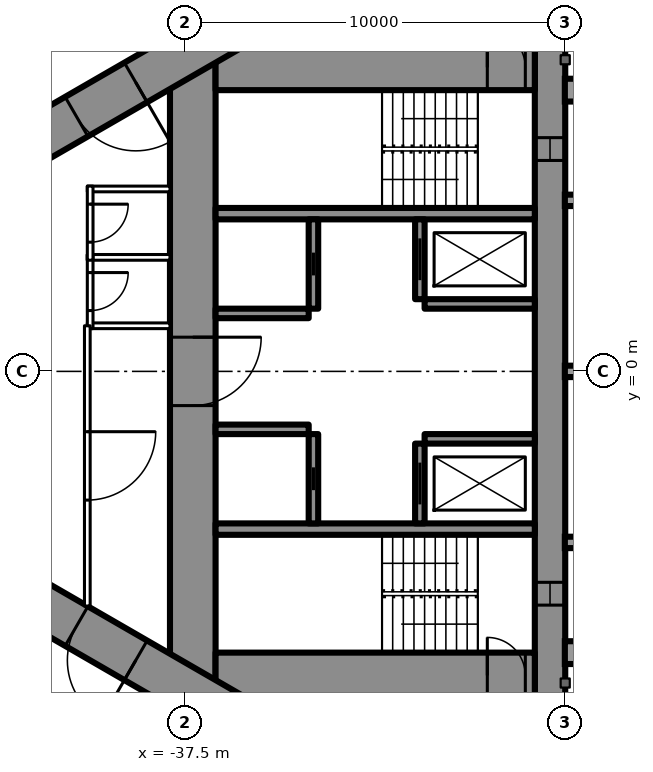
"""IFC4 building model, lengths in metres.
Left out: names, types, materials, properties, quantities, classifications, styles, units other than length and angle.
Written with IfcOpenShell. Run it as: python <this file> out.ifc"""

import sys

from ifc_helpers import new_model, si_unit, direction, frame, frame_2d, origin, place, context, subcontext, project, spatial, rectangle, extrude, element, fill, save


model = new_model("IFC4")
c1 = context("Model", 3, precision=1e-05, world=origin(), true_north=direction((0.0, 1.0)))
c2 = subcontext(c1, "Body", "Model", "MODEL_VIEW")
j1 = project(units=[si_unit("LENGTHUNIT", "METRE"), si_unit("PLANEANGLEUNIT", "RADIAN")], contexts=[c1])
p1 = place(None, origin())
s1 = spatial("IfcSite", under=j1, at=p1, CompositionType="ELEMENT")
p2 = place(p1, origin())
s2 = spatial("IfcBuilding", under=s1, at=p2, CompositionType="ELEMENT")
p3 = place(p2, frame((0.0, 0.0, 18.0)))
s3 = spatial("IfcBuildingStorey", under=s2, at=p3, CompositionType="ELEMENT", Elevation=18.0)
p4 = place(p3, frame((-27.9, 8.6, 0.0), z_axis=(0.0, 0.0, 1.0), x_axis=(0.0, -1.0, 0.0)))
e1 = element("IfcWall", 1, at=p4, inside=s3, PredefinedType="SHEAR", context=c2, shape_type="SweptSolid", body=[
    extrude(rectangle(XDim=17.2, YDim=0.8, at=frame_2d((8.6, 0.0))), origin(), (0.0, 0.0, 1.0), 3.5),
])
p5 = place(p4, frame((2.45, 0.0, 0.6)))
e2 = element("IfcOpeningElement", 2, at=p5, cuts=e1, PredefinedType="OPENING", context=c2, shape_type="SweptSolid", body=[
    extrude(rectangle(XDim=0.6, YDim=2.1, at=frame_2d((0.3, 1.05))), frame((0.0, 0.41, 0.0), z_axis=(0.0, -1.0, 0.0), x_axis=(1.0, 0.0, 0.0)), (0.0, 0.0, 1.0), 0.82),
])
p6 = place(p4, frame((14.15, 0.0, 0.6)))
e3 = element("IfcOpeningElement", 3, at=p6, cuts=e1, PredefinedType="OPENING", context=c2, shape_type="SweptSolid", body=[
    extrude(rectangle(XDim=0.6, YDim=2.1, at=frame_2d((0.3, 1.05))), frame((0.0, 0.41, 0.0), z_axis=(0.0, -1.0, 0.0), x_axis=(1.0, 0.0, 0.0)), (0.0, 0.0, 1.0), 0.82),
])
p7 = place(p3, frame((-37.3, 8.6, 0.0), z_axis=(0.0, 0.0, 1.0), x_axis=(0.0, -1.0, 0.0)))
e4 = element("IfcWall", 4, at=p7, inside=s3, PredefinedType="SHEAR", context=c2, shape_type="SweptSolid", body=[
    extrude(rectangle(XDim=17.2, YDim=1.2, at=frame_2d((8.6, 0.0))), origin(), (0.0, 0.0, 1.0), 3.5),
])
p8 = place(p7, frame((7.7, 0.0, 0.0)))
e5 = element("IfcOpeningElement", 5, at=p8, cuts=e4, PredefinedType="OPENING", context=c2, shape_type="SweptSolid", body=[
    extrude(rectangle(XDim=1.8, YDim=2.2, at=frame_2d((0.9, 1.1))), frame((0.0, 0.61, 0.0), z_axis=(0.0, -1.0, 0.0), x_axis=(1.0, 0.0, 0.0)), (0.0, 0.0, 1.0), 1.22),
])
p9 = place(p3, frame((-28.3, 8.0, 0.0), z_axis=(0.0, 0.0, 1.0), x_axis=(-1.0, 0.0, 0.0)))
e6 = element("IfcWall", 6, at=p9, inside=s3, PredefinedType="SHEAR", context=c2, shape_type="SweptSolid", body=[
    extrude(rectangle(XDim=8.4, YDim=1.2, at=frame_2d((4.2, 0.0))), origin(), (0.0, 0.0, 1.0), 3.5),
])
p10 = place(p9, frame((0.25, 0.0, 0.0)))
e7 = element("IfcOpeningElement", 7, at=p10, cuts=e6, PredefinedType="OPENING", context=c2, shape_type="SweptSolid", body=[
    extrude(rectangle(XDim=1.0, YDim=2.2, at=frame_2d((0.5, 1.1))), frame((0.0, 0.61, 0.0), z_axis=(0.0, -1.0, 0.0), x_axis=(1.0, 0.0, 0.0)), (0.0, 0.0, 1.0), 1.22),
])
p11 = place(p3, frame((-28.3, -8.0, 0.0), z_axis=(0.0, 0.0, 1.0), x_axis=(-1.0, 0.0, 0.0)))
e8 = element("IfcWall", 8, at=p11, inside=s3, PredefinedType="SHEAR", context=c2, shape_type="SweptSolid", body=[
    extrude(rectangle(XDim=8.4, YDim=1.2, at=frame_2d((4.2, 0.0))), origin(), (0.0, 0.0, 1.0), 3.5),
])
p12 = place(p11, frame((0.25, 0.0, 0.0)))
e9 = element("IfcOpeningElement", 9, at=p12, cuts=e8, PredefinedType="OPENING", context=c2, shape_type="SweptSolid", body=[
    extrude(rectangle(XDim=1.0, YDim=2.2, at=frame_2d((0.5, 1.1))), frame((0.0, 0.61, 0.0), z_axis=(0.0, -1.0, 0.0), x_axis=(1.0, 0.0, 0.0)), (0.0, 0.0, 1.0), 1.22),
])
for number, where, z_axis, x_axis in (
    (10, (-28.3, 4.15, 0.0), (0.0, 0.0, 1.0), (-1.0, 0.0, 0.0)),
    (11, (-28.3, -4.15, 0.0), (0.0, 0.0, 1.0), (-1.0, 0.0, 0.0)),
):
    element("IfcWall", number, at=place(p3, frame(where, z_axis=z_axis, x_axis=x_axis)), inside=s3, PredefinedType="SHEAR", context=c2, shape_type="SweptSolid", body=[
        extrude(rectangle(XDim=8.4, YDim=0.3, at=frame_2d((4.2, 0.0))), origin(), (0.0, 0.0, 1.0), 3.5),
    ])
p13 = place(p3, frame((-31.325, 4.0, 0.0), z_axis=(0.0, 0.0, 1.0), x_axis=(0.0, -1.0, 0.0)))
e12 = element("IfcWall", 12, at=p13, inside=s3, PredefinedType="SHEAR", context=c2, shape_type="SweptSolid", body=[
    extrude(rectangle(XDim=2.1, YDim=0.25, at=frame_2d((1.05, 0.0))), origin(), (0.0, 0.0, 1.0), 3.5),
])
p14 = place(p13, frame((0.5, 0.0, 0.0)))
e13 = element("IfcOpeningElement", 13, at=p14, cuts=e12, PredefinedType="OPENING", context=c2, shape_type="SweptSolid", body=[
    extrude(rectangle(XDim=1.1, YDim=2.2, at=frame_2d((0.55, 1.1))), frame((0.0, 0.135, 0.0), z_axis=(0.0, -1.0, 0.0), x_axis=(1.0, 0.0, 0.0)), (0.0, 0.0, 1.0), 0.27),
])
p15 = place(p3, frame((-34.125, 4.0, 0.0), z_axis=(0.0, 0.0, 1.0), x_axis=(0.0, -1.0, 0.0)))
e14 = element("IfcWall", 14, at=p15, inside=s3, PredefinedType="SHEAR", context=c2, shape_type="SweptSolid", body=[
    extrude(rectangle(XDim=2.35, YDim=0.25, at=frame_2d((1.175, 0.0))), origin(), (0.0, 0.0, 1.0), 3.5),
])
p16 = place(p15, frame((0.875, 0.0, 0.0)))
e15 = element("IfcOpeningElement", 15, at=p16, cuts=e14, PredefinedType="OPENING", context=c2, shape_type="SweptSolid", body=[
    extrude(rectangle(XDim=0.6, YDim=2.0, at=frame_2d((0.3, 1.0))), frame((0.0, 0.135, 0.0), z_axis=(0.0, -1.0, 0.0), x_axis=(1.0, 0.0, 0.0)), (0.0, 0.0, 1.0), 0.27),
])
p17 = place(p3, frame((-28.3, 1.775, 0.0), z_axis=(0.0, 0.0, 1.0), x_axis=(-1.0, 0.0, 0.0)))
e16 = element("IfcWall", 16, at=p17, inside=s3, PredefinedType="SHEAR", context=c2, shape_type="SweptSolid", body=[
    extrude(rectangle(XDim=2.9, YDim=0.25, at=frame_2d((1.45, 0.0))), origin(), (0.0, 0.0, 1.0), 3.5),
])
p18 = place(p3, frame((-34.25, 1.525, 0.0), z_axis=(0.0, 0.0, 1.0), x_axis=(-1.0, 0.0, 0.0)))
e17 = element("IfcWall", 17, at=p18, inside=s3, PredefinedType="SHEAR", context=c2, shape_type="SweptSolid", body=[
    extrude(rectangle(XDim=2.45, YDim=0.25, at=frame_2d((1.225, 0.0))), origin(), (0.0, 0.0, 1.0), 3.5),
])
p19 = place(p3, frame((-31.325, -1.9, 0.0), z_axis=(0.0, 0.0, 1.0), x_axis=(0.0, -1.0, 0.0)))
e18 = element("IfcWall", 18, at=p19, inside=s3, PredefinedType="SHEAR", context=c2, shape_type="SweptSolid", body=[
    extrude(rectangle(XDim=2.1, YDim=0.25, at=frame_2d((1.05, 0.0))), origin(), (0.0, 0.0, 1.0), 3.5),
])
p20 = place(p19, frame((0.5, 0.0, 0.0)))
e19 = element("IfcOpeningElement", 19, at=p20, cuts=e18, PredefinedType="OPENING", context=c2, shape_type="SweptSolid", body=[
    extrude(rectangle(XDim=1.1, YDim=2.2, at=frame_2d((0.55, 1.1))), frame((0.0, 0.135, 0.0), z_axis=(0.0, -1.0, 0.0), x_axis=(1.0, 0.0, 0.0)), (0.0, 0.0, 1.0), 0.27),
])
p21 = place(p3, frame((-34.125, -1.65, 0.0), z_axis=(0.0, 0.0, 1.0), x_axis=(0.0, -1.0, 0.0)))
e20 = element("IfcWall", 20, at=p21, inside=s3, PredefinedType="SHEAR", context=c2, shape_type="SweptSolid", body=[
    extrude(rectangle(XDim=2.35, YDim=0.25, at=frame_2d((1.175, 0.0))), origin(), (0.0, 0.0, 1.0), 3.5),
])
p22 = place(p21, frame((0.875, 0.0, 0.0)))
e21 = element("IfcOpeningElement", 21, at=p22, cuts=e20, PredefinedType="OPENING", context=c2, shape_type="SweptSolid", body=[
    extrude(rectangle(XDim=0.6, YDim=2.0, at=frame_2d((0.3, 1.0))), frame((0.0, 0.135, 0.0), z_axis=(0.0, -1.0, 0.0), x_axis=(1.0, 0.0, 0.0)), (0.0, 0.0, 1.0), 0.27),
])
p23 = place(p3, frame((-28.3, -1.775, 0.0), z_axis=(0.0, 0.0, 1.0), x_axis=(-1.0, 0.0, 0.0)))
e22 = element("IfcWall", 22, at=p23, inside=s3, PredefinedType="SHEAR", context=c2, shape_type="SweptSolid", body=[
    extrude(rectangle(XDim=2.9, YDim=0.25, at=frame_2d((1.45, 0.0))), origin(), (0.0, 0.0, 1.0), 3.5),
])
p24 = place(p3, frame((-34.25, -1.525, 0.0), z_axis=(0.0, 0.0, 1.0), x_axis=(-1.0, 0.0, 0.0)))
e23 = element("IfcWall", 23, at=p24, inside=s3, PredefinedType="SHEAR", context=c2, shape_type="SweptSolid", body=[
    extrude(rectangle(XDim=2.45, YDim=0.25, at=frame_2d((1.225, 0.0))), origin(), (0.0, 0.0, 1.0), 3.5),
])
p25 = place(p3, frame((-27.2, 14.3, 0.0), z_axis=(0.0, 0.0, 1.0), x_axis=(-0.866026593062, -0.499997940104, 0.0)))
e24 = element("IfcWall", 24, at=p25, inside=s3, PredefinedType="SHEAR", context=c2, shape_type="SweptSolid", body=[
    extrude(rectangle(XDim=28.946, YDim=1.2, at=frame_2d((14.473, 0.0))), origin(), (0.0, 0.0, 1.0), 3.5),
])
p26 = place(p25, frame((4.6, 0.0, 0.0)))
e25 = element("IfcOpeningElement", 25, at=p26, cuts=e24, PredefinedType="OPENING", context=c2, shape_type="SweptSolid", body=[
    extrude(rectangle(XDim=1.0, YDim=2.2, at=frame_2d((0.5, 1.1))), frame((0.0, 0.61, 0.0), z_axis=(0.0, -1.0, 0.0), x_axis=(1.0, 0.0, 0.0)), (0.0, 0.0, 1.0), 1.22),
])
p27 = place(p25, frame((13.395, 0.0, 0.0)))
e26 = element("IfcOpeningElement", 26, at=p27, cuts=e24, PredefinedType="OPENING", context=c2, shape_type="SweptSolid", body=[
    extrude(rectangle(XDim=1.8, YDim=2.2, at=frame_2d((0.9, 1.1))), frame((0.0, 0.61, 0.0), z_axis=(0.0, -1.0, 0.0), x_axis=(1.0, 0.0, 0.0)), (0.0, 0.0, 1.0), 1.22),
])
p28 = place(p3, frame((-27.2, -14.3, 0.0), z_axis=(0.0, 0.0, 1.0), x_axis=(-0.866024021859, 0.500002393557, 0.0)))
e27 = element("IfcWall", 27, at=p28, inside=s3, PredefinedType="SHEAR", context=c2, shape_type="SweptSolid", body=[
    extrude(rectangle(XDim=27.907, YDim=1.2, at=frame_2d((13.954, 0.0))), origin(), (0.0, 0.0, 1.0), 3.5),
])
p29 = place(p28, frame((4.6, 0.0, 0.0)))
e28 = element("IfcOpeningElement", 28, at=p29, cuts=e27, PredefinedType="OPENING", context=c2, shape_type="SweptSolid", body=[
    extrude(rectangle(XDim=1.0, YDim=2.2, at=frame_2d((0.5, 1.1))), frame((0.0, 0.61, 0.0), z_axis=(0.0, -1.0, 0.0), x_axis=(1.0, 0.0, 0.0)), (0.0, 0.0, 1.0), 1.22),
])
p30 = place(p28, frame((13.395, 0.0, 0.0)))
e29 = element("IfcOpeningElement", 29, at=p30, cuts=e27, PredefinedType="OPENING", context=c2, shape_type="SweptSolid", body=[
    extrude(rectangle(XDim=1.8, YDim=2.2, at=frame_2d((0.9, 1.1))), frame((0.0, 0.61, 0.0), z_axis=(0.0, -1.0, 0.0), x_axis=(1.0, 0.0, 0.0)), (0.0, 0.0, 1.0), 1.22),
])
p31 = place(p3, frame((-37.7, 10.894, 0.0), z_axis=(0.0, 0.0, 1.0), x_axis=(-0.866027905338, -0.499995667157, 0.0)))
e30 = element("IfcWall", 30, at=p31, inside=s3, PredefinedType="PARTITIONING", context=c2, shape_type="SweptSolid", body=[
    extrude(rectangle(XDim=21.787, YDim=0.2, at=frame_2d((10.894, 0.0))), origin(), (0.0, 0.0, 1.0), 3.25),
])
p32 = place(p31, frame((11.78, 0.0, 0.0)))
e31 = element("IfcOpeningElement", 31, at=p32, cuts=e30, PredefinedType="OPENING", context=c2, shape_type="SweptSolid", body=[
    extrude(rectangle(XDim=0.95, YDim=2.2, at=frame_2d((0.475, 1.1))), frame((0.0, 0.11, 0.0), z_axis=(0.0, -1.0, 0.0), x_axis=(1.0, 0.0, 0.0)), (0.0, 0.0, 1.0), 0.22),
])
p33 = place(p31, frame((7.73, 0.0, 0.0)))
e32 = element("IfcOpeningElement", 32, at=p33, cuts=e30, PredefinedType="OPENING", context=c2, shape_type="SweptSolid", body=[
    extrude(rectangle(XDim=0.95, YDim=2.2, at=frame_2d((0.475, 1.1))), frame((0.0, 0.11, 0.0), z_axis=(0.0, -1.0, 0.0), x_axis=(1.0, 0.0, 0.0)), (0.0, 0.0, 1.0), 0.22),
])
p34 = place(p3, frame((-36.92, -11.344, 0.0), z_axis=(0.0, 0.0, 1.0), x_axis=(-0.866028313256, 0.499994960614, 0.0)))
e33 = element("IfcWall", 33, at=p34, inside=s3, PredefinedType="PARTITIONING", context=c2, shape_type="SweptSolid", body=[
    extrude(rectangle(XDim=22.568, YDim=0.2, at=frame_2d((11.284, 0.0))), origin(), (0.0, 0.0, 1.0), 3.25),
])
p35 = place(p34, frame((15.03, 0.0, 0.0)))
e34 = element("IfcOpeningElement", 34, at=p35, cuts=e33, PredefinedType="OPENING", context=c2, shape_type="SweptSolid", body=[
    extrude(rectangle(XDim=0.95, YDim=2.2, at=frame_2d((0.475, 1.1))), frame((0.0, 0.11, 0.0), z_axis=(0.0, -1.0, 0.0), x_axis=(1.0, 0.0, 0.0)), (0.0, 0.0, 1.0), 0.22),
])
p36 = place(p34, frame((3.35, 0.0, 0.0)))
e35 = element("IfcOpeningElement", 35, at=p36, cuts=e33, PredefinedType="OPENING", context=c2, shape_type="SweptSolid", body=[
    extrude(rectangle(XDim=1.0, YDim=2.2, at=frame_2d((0.5, 1.1))), frame((0.0, 0.11, 0.0), z_axis=(0.0, -1.0, 0.0), x_axis=(1.0, 0.0, 0.0)), (0.0, 0.0, 1.0), 0.22),
])
for number, where, z_axis, x_axis in (
    (36, (-37.9, 1.2, 0.0), (0.0, 0.0, 1.0), (-1.0, 0.0, 0.0)),
    (37, (-37.9, 3.0, 0.0), (0.0, 0.0, 1.0), (-1.0, 0.0, 0.0)),
    (38, (-37.9, 4.8, 0.0), (0.0, 0.0, 1.0), (-1.0, 0.0, 0.0)),
):
    element("IfcWall", number, at=place(p3, frame(where, z_axis=z_axis, x_axis=x_axis)), inside=s3, PredefinedType="PARTITIONING", context=c2, shape_type="SweptSolid", body=[
        extrude(rectangle(XDim=2.175, YDim=0.15, at=frame_2d((1.087, 0.0))), origin(), (0.0, 0.0, 1.0), 3.25),
    ])
p37 = place(p3, frame((-40.0, 3.075, 0.0), z_axis=(0.0, 0.0, 1.0), x_axis=(0.0, -1.0, 0.0)))
e39 = element("IfcWall", 39, at=p37, inside=s3, PredefinedType="PARTITIONING", context=c2, shape_type="SweptSolid", body=[
    extrude(rectangle(XDim=1.95, YDim=0.15, at=frame_2d((0.975, 0.0))), origin(), (0.0, 0.0, 1.0), 3.25),
])
p38 = place(p37, frame((0.475, 0.0, 0.0)))
e40 = element("IfcOpeningElement", 40, at=p38, cuts=e39, PredefinedType="OPENING", context=c2, shape_type="SweptSolid", body=[
    extrude(rectangle(XDim=1.0, YDim=2.2, at=frame_2d((0.5, 1.1))), frame((0.0, 0.085, 0.0), z_axis=(0.0, -1.0, 0.0), x_axis=(1.0, 0.0, 0.0)), (0.0, 0.0, 1.0), 0.17),
])
p39 = place(p3, frame((-40.0, 4.875, 0.0), z_axis=(0.0, 0.0, 1.0), x_axis=(0.0, -1.0, 0.0)))
e41 = element("IfcWall", 41, at=p39, inside=s3, PredefinedType="PARTITIONING", context=c2, shape_type="SweptSolid", body=[
    extrude(rectangle(XDim=1.95, YDim=0.15, at=frame_2d((0.975, 0.0))), origin(), (0.0, 0.0, 1.0), 3.25),
])
p40 = place(p39, frame((0.475, 0.0, 0.0)))
e42 = element("IfcOpeningElement", 42, at=p40, cuts=e41, PredefinedType="OPENING", context=c2, shape_type="SweptSolid", body=[
    extrude(rectangle(XDim=1.0, YDim=2.2, at=frame_2d((0.5, 1.1))), frame((0.0, 0.085, 0.0), z_axis=(0.0, -1.0, 0.0), x_axis=(1.0, 0.0, 0.0)), (0.0, 0.0, 1.0), 0.17),
])
p41 = place(p3, frame((-40.075, 1.2, 0.0), z_axis=(0.0, 0.0, 1.0), x_axis=(0.0, -1.0, 0.0)))
e43 = element("IfcWall", 43, at=p41, inside=s3, PredefinedType="PARTITIONING", context=c2, shape_type="SweptSolid", body=[
    extrude(rectangle(XDim=7.374, YDim=0.15, at=frame_2d((3.687, 0.0))), origin(), (0.0, 0.0, 1.0), 3.25),
])
p42 = place(p41, frame((2.787, 0.0, 0.0)))
e44 = element("IfcOpeningElement", 44, at=p42, cuts=e43, PredefinedType="OPENING", context=c2, shape_type="SweptSolid", body=[
    extrude(rectangle(XDim=1.8, YDim=2.2, at=frame_2d((0.9, 1.1))), frame((0.0, 0.085, 0.0), z_axis=(0.0, -1.0, 0.0), x_axis=(1.0, 0.0, 0.0)), (0.0, 0.0, 1.0), 0.17),
])
p43 = place(p38, origin())
e45 = element("IfcDoor", 45, at=p43, inside=s3, OperationType="SINGLE_SWING_LEFT", PredefinedType="DOOR", context=c2, shape_type="SweptSolid", body=[
    extrude(rectangle(XDim=1.0, YDim=2.2, at=frame_2d((0.5, 1.1))), frame((0.0, 0.025, 0.0), z_axis=(0.0, -1.0, 0.0), x_axis=(1.0, 0.0, 0.0)), (0.0, 0.0, 1.0), 0.05),
])
fill(e40, e45)
p44 = place(p40, origin())
e46 = element("IfcDoor", 46, at=p44, inside=s3, OperationType="SINGLE_SWING_LEFT", PredefinedType="DOOR", context=c2, shape_type="SweptSolid", body=[
    extrude(rectangle(XDim=1.0, YDim=2.2, at=frame_2d((0.5, 1.1))), frame((0.0, 0.025, 0.0), z_axis=(0.0, -1.0, 0.0), x_axis=(1.0, 0.0, 0.0)), (0.0, 0.0, 1.0), 0.05),
])
fill(e42, e46)
p45 = place(p42, origin())
e47 = element("IfcDoor", 47, at=p45, inside=s3, OperationType="DOUBLE_DOOR_SINGLE_SWING", PredefinedType="DOOR", context=c2, shape_type="SweptSolid", body=[
    extrude(rectangle(XDim=1.8, YDim=2.2, at=frame_2d((0.9, 1.1))), frame((0.0, 0.025, 0.0), z_axis=(0.0, -1.0, 0.0), x_axis=(1.0, 0.0, 0.0)), (0.0, 0.0, 1.0), 0.05),
])
fill(e44, e47)
p46 = place(p27, origin())
e48 = element("IfcDoor", 48, at=p46, inside=s3, OperationType="DOUBLE_DOOR_SINGLE_SWING", PredefinedType="DOOR", context=c2, shape_type="SweptSolid", body=[
    extrude(rectangle(XDim=1.8, YDim=2.2, at=frame_2d((0.9, 1.1))), frame((0.0, 0.025, 0.0), z_axis=(0.0, -1.0, 0.0), x_axis=(1.0, 0.0, 0.0)), (0.0, 0.0, 1.0), 0.05),
])
fill(e26, e48)
p47 = place(p30, origin())
e49 = element("IfcDoor", 49, at=p47, inside=s3, OperationType="DOUBLE_DOOR_SINGLE_SWING", PredefinedType="DOOR", context=c2, shape_type="SweptSolid", body=[
    extrude(rectangle(XDim=1.8, YDim=2.2, at=frame_2d((0.9, 1.1))), frame((0.0, 0.025, 0.0), z_axis=(0.0, -1.0, 0.0), x_axis=(1.0, 0.0, 0.0)), (0.0, 0.0, 1.0), 0.05),
])
fill(e29, e49)
p48 = place(p8, origin())
e50 = element("IfcDoor", 50, at=p48, inside=s3, OperationType="DOUBLE_DOOR_SINGLE_SWING", PredefinedType="DOOR", context=c2, shape_type="SweptSolid", body=[
    extrude(rectangle(XDim=1.8, YDim=2.2, at=frame_2d((0.9, 1.1))), frame((0.0, 0.025, 0.0), z_axis=(0.0, -1.0, 0.0), x_axis=(1.0, 0.0, 0.0)), (0.0, 0.0, 1.0), 0.05),
])
fill(e5, e50)
p49 = place(p10, origin())
e51 = element("IfcDoor", 51, at=p49, inside=s3, OperationType="SINGLE_SWING_RIGHT", PredefinedType="DOOR", context=c2, shape_type="SweptSolid", body=[
    extrude(rectangle(XDim=1.0, YDim=2.2, at=frame_2d((0.5, 1.1))), frame((0.0, 0.025, 0.0), z_axis=(0.0, -1.0, 0.0), x_axis=(1.0, 0.0, 0.0)), (0.0, 0.0, 1.0), 0.05),
])
fill(e7, e51)
p50 = place(p12, origin())
e52 = element("IfcDoor", 52, at=p50, inside=s3, OperationType="SINGLE_SWING_RIGHT", PredefinedType="DOOR", context=c2, shape_type="SweptSolid", body=[
    extrude(rectangle(XDim=1.0, YDim=2.2, at=frame_2d((0.5, 1.1))), frame((0.0, 0.025, 0.0), z_axis=(0.0, -1.0, 0.0), x_axis=(1.0, 0.0, 0.0)), (0.0, 0.0, 1.0), 0.05),
])
fill(e9, e52)
p51 = place(p14, origin())
e53 = element("IfcDoor", 53, at=p51, inside=s3, OperationType="SLIDING_TO_LEFT", PredefinedType="USERDEFINED", context=c2, shape_type="SweptSolid", body=[
    extrude(rectangle(XDim=1.1, YDim=2.2, at=frame_2d((0.55, 1.1))), frame((0.0, 0.025, 0.0), z_axis=(0.0, -1.0, 0.0), x_axis=(1.0, 0.0, 0.0)), (0.0, 0.0, 1.0), 0.05),
])
fill(e13, e53)
p52 = place(p20, origin())
e54 = element("IfcDoor", 54, at=p52, inside=s3, OperationType="SLIDING_TO_LEFT", PredefinedType="USERDEFINED", context=c2, shape_type="SweptSolid", body=[
    extrude(rectangle(XDim=1.1, YDim=2.2, at=frame_2d((0.55, 1.1))), frame((0.0, 0.025, 0.0), z_axis=(0.0, -1.0, 0.0), x_axis=(1.0, 0.0, 0.0)), (0.0, 0.0, 1.0), 0.05),
])
fill(e19, e54)
p53 = place(p16, origin())
e55 = element("IfcDoor", 55, at=p53, inside=s3, OperationType="SLIDING_TO_LEFT", PredefinedType="DOOR", context=c2, shape_type="SweptSolid", body=[
    extrude(rectangle(XDim=0.6, YDim=2.0, at=frame_2d((0.3, 1.0))), frame((0.0, 0.025, 0.0), z_axis=(0.0, -1.0, 0.0), x_axis=(1.0, 0.0, 0.0)), (0.0, 0.0, 1.0), 0.05),
])
fill(e15, e55)
p54 = place(p22, origin())
e56 = element("IfcDoor", 56, at=p54, inside=s3, OperationType="SLIDING_TO_LEFT", PredefinedType="DOOR", context=c2, shape_type="SweptSolid", body=[
    extrude(rectangle(XDim=0.6, YDim=2.0, at=frame_2d((0.3, 1.0))), frame((0.0, 0.025, 0.0), z_axis=(0.0, -1.0, 0.0), x_axis=(1.0, 0.0, 0.0)), (0.0, 0.0, 1.0), 0.05),
])
fill(e21, e56)
p55 = place(p5, origin())
e57 = element("IfcWindow", 57, at=p55, inside=s3, PartitioningType="SINGLE_PANEL", PredefinedType="WINDOW", context=c2, shape_type="SweptSolid", body=[
    extrude(rectangle(XDim=0.6, YDim=2.1, at=frame_2d((0.3, 1.05))), frame((0.0, 0.03, 0.0), z_axis=(0.0, -1.0, 0.0), x_axis=(1.0, 0.0, 0.0)), (0.0, 0.0, 1.0), 0.06),
])
fill(e2, e57)
p56 = place(p6, origin())
e58 = element("IfcWindow", 58, at=p56, inside=s3, PartitioningType="SINGLE_PANEL", PredefinedType="WINDOW", context=c2, shape_type="SweptSolid", body=[
    extrude(rectangle(XDim=0.6, YDim=2.1, at=frame_2d((0.3, 1.05))), frame((0.0, 0.03, 0.0), z_axis=(0.0, -1.0, 0.0), x_axis=(1.0, 0.0, 0.0)), (0.0, 0.0, 1.0), 0.06),
])
fill(e3, e58)
save(model, sys.argv[1])
